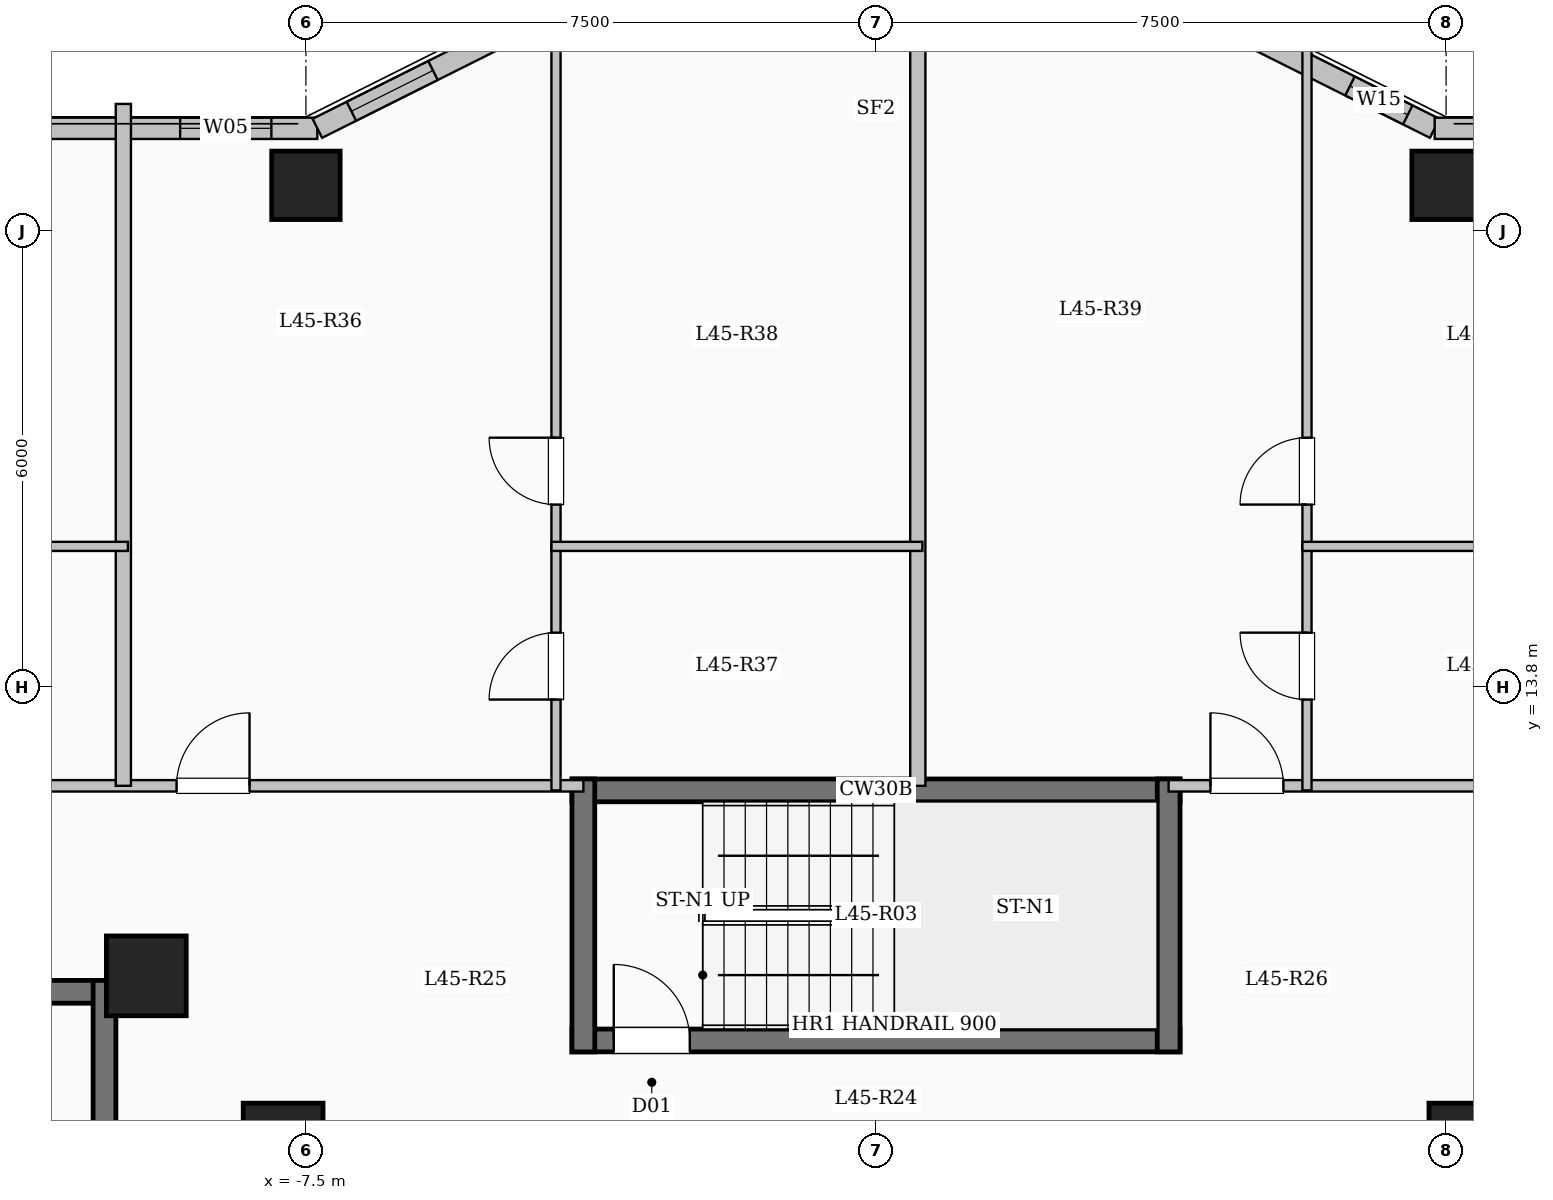
"""IFC4 building model, lengths in metres.
Left out: names, types, materials, properties, quantities, classifications, styles, units other than length and angle.
Written with IfcOpenShell. Run it as: python <this file> out.ifc"""

import sys

from ifc_helpers import new_model, si_unit, direction, frame, frame_2d, origin, origin_2d, place, context, subcontext, project, spatial, rectangle, extrude, element, fill, save


model = new_model("IFC4")
c1 = context("Model", 3, precision=1e-05, world=origin(), true_north=direction((0.0, 1.0)))
c2 = subcontext(c1, "Body", "Model", "MODEL_VIEW")
j1 = project(units=[si_unit("LENGTHUNIT", "METRE"), si_unit("PLANEANGLEUNIT", "RADIAN")], contexts=[c1])
p1 = place(None, origin())
s1 = spatial("IfcSite", under=j1, at=p1, CompositionType="ELEMENT")
p2 = place(p1, origin())
s2 = spatial("IfcBuilding", under=s1, at=p2, CompositionType="ELEMENT")
p3 = place(p2, frame((0.0, 0.0, 166.1)))
s3 = spatial("IfcBuildingStorey", under=s2, at=p3, CompositionType="ELEMENT", Elevation=166.1)
for number, where, z_axis, x_axis in (
    (1, (-7.8, 7.8, 0.0), (0.0, 0.0, 1.0), (1.0, 0.0, 0.0)),
    (2, (7.8, 7.8, 0.0), (0.0, 0.0, 1.0), (1.0, 0.0, 0.0)),
    (3, (-9.6, 10.0, 0.0), (0.0, 0.0, 1.0), (1.0, 0.0, 0.0)),
):
    element("IfcColumn", number, at=place(p3, frame(where, z_axis=z_axis, x_axis=x_axis)), inside=s3, PredefinedType="COLUMN", context=c2, shape_type="SweptSolid", body=[
        extrude(rectangle(XDim=1.05, YDim=1.05, at=origin_2d()), origin(), (0.0, 0.0, 1.0), 3.35),
    ])
for number, where, z_axis, x_axis in (
    (4, (-7.5, 20.4, 0.0), (0.0, 0.0, 1.0), (1.0, 0.0, 0.0)),
    (5, (7.5, 20.4, 0.0), (0.0, 0.0, 1.0), (1.0, 0.0, 0.0)),
):
    element("IfcColumn", number, at=place(p3, frame(where, z_axis=z_axis, x_axis=x_axis)), inside=s3, PredefinedType="COLUMN", context=c2, shape_type="SweptSolid", body=[
        extrude(rectangle(XDim=0.9, YDim=0.9, at=origin_2d()), origin(), (0.0, 0.0, 1.0), 3.35),
    ])
p4 = place(p3, frame((-19.65, 21.15, 0.0), z_axis=(0.0, 0.0, 1.0), x_axis=(1.0, 0.0, 0.0)))
e6 = element("IfcWall", 6, at=p4, inside=s3, PredefinedType="SOLIDWALL", context=c2, shape_type="SweptSolid", body=[
    extrude(rectangle(XDim=12.3, YDim=0.28, at=frame_2d((6.15, 0.0))), origin(), (0.0, 0.0, 1.0), 3.1),
])
p5 = place(p4, frame((1.435, 0.0, 0.9)))
e7 = element("IfcOpeningElement", 7, at=p5, cuts=e6, PredefinedType="OPENING", context=c2, shape_type="SweptSolid", body=[
    extrude(rectangle(XDim=2.2, YDim=1.75, at=frame_2d((1.1, 0.875))), frame((0.0, 0.15, 0.0), z_axis=(0.0, -1.0, 0.0), x_axis=(1.0, 0.0, 0.0)), (0.0, 0.0, 1.0), 0.3),
])
p6 = place(p4, frame((6.555, 0.0, 0.9)))
e8 = element("IfcOpeningElement", 8, at=p6, cuts=e6, PredefinedType="OPENING", context=c2, shape_type="SweptSolid", body=[
    extrude(rectangle(XDim=1.65, YDim=1.6, at=frame_2d((0.825, 0.8))), frame((0.0, 0.15, 0.0), z_axis=(0.0, -1.0, 0.0), x_axis=(1.0, 0.0, 0.0)), (0.0, 0.0, 1.0), 0.3),
])
p7 = place(p4, frame((10.495, 0.0, 0.95)))
e9 = element("IfcOpeningElement", 9, at=p7, cuts=e6, PredefinedType="OPENING", context=c2, shape_type="SweptSolid", body=[
    extrude(rectangle(XDim=1.2, YDim=1.5, at=frame_2d((0.6, 0.75))), frame((0.0, 0.15, 0.0), z_axis=(0.0, -1.0, 0.0), x_axis=(1.0, 0.0, 0.0)), (0.0, 0.0, 1.0), 0.3),
])
p8 = place(p3, frame((-7.35, 21.15, 0.0), z_axis=(0.0, 0.0, 1.0), x_axis=(0.894427191, 0.4472135955, 0.0)))
e10 = element("IfcWall", 10, at=p8, inside=s3, PredefinedType="SOLIDWALL", context=c2, shape_type="SweptSolid", body=[
    extrude(rectangle(XDim=3.354, YDim=0.28, at=frame_2d((1.677, 0.0))), origin(), (0.0, 0.0, 1.0), 3.1),
])
p9 = place(p8, frame((0.501, 0.0, 0.95)))
e11 = element("IfcOpeningElement", 11, at=p9, cuts=e10, PredefinedType="OPENING", context=c2, shape_type="SweptSolid", body=[
    extrude(rectangle(XDim=1.2, YDim=1.5, at=frame_2d((0.6, 0.75))), frame((0.0, 0.15, 0.0), z_axis=(0.0, -1.0, 0.0), x_axis=(1.0, 0.0, 0.0)), (0.0, 0.0, 1.0), 0.3),
])
p10 = place(p3, frame((4.35, 22.65, 0.0), z_axis=(0.0, 0.0, 1.0), x_axis=(0.894427191, -0.4472135955, 0.0)))
e12 = element("IfcWall", 12, at=p10, inside=s3, PredefinedType="SOLIDWALL", context=c2, shape_type="SweptSolid", body=[
    extrude(rectangle(XDim=3.354, YDim=0.28, at=frame_2d((1.677, 0.0))), origin(), (0.0, 0.0, 1.0), 3.1),
])
p11 = place(p10, frame((2.108, 0.0, 0.95)))
e13 = element("IfcOpeningElement", 13, at=p11, cuts=e12, PredefinedType="OPENING", context=c2, shape_type="SweptSolid", body=[
    extrude(rectangle(XDim=0.85, YDim=1.5, at=frame_2d((0.425, 0.75))), frame((0.0, 0.15, 0.0), z_axis=(0.0, -1.0, 0.0), x_axis=(1.0, 0.0, 0.0)), (0.0, 0.0, 1.0), 0.3),
])
p12 = place(p3, frame((7.35, 21.15, 0.0), z_axis=(0.0, 0.0, 1.0), x_axis=(1.0, 0.0, 0.0)))
e14 = element("IfcWall", 14, at=p12, inside=s3, PredefinedType="SOLIDWALL", context=c2, shape_type="SweptSolid", body=[
    extrude(rectangle(XDim=12.3, YDim=0.28, at=frame_2d((6.15, 0.0))), origin(), (0.0, 0.0, 1.0), 3.1),
])
p13 = place(p12, frame((0.731, 0.0, 0.9)))
e15 = element("IfcOpeningElement", 15, at=p13, cuts=e14, PredefinedType="OPENING", context=c2, shape_type="SweptSolid", body=[
    extrude(rectangle(XDim=1.5, YDim=1.65, at=frame_2d((0.75, 0.825))), frame((0.0, 0.15, 0.0), z_axis=(0.0, -1.0, 0.0), x_axis=(1.0, 0.0, 0.0)), (0.0, 0.0, 1.0), 0.3),
])
p14 = place(p12, frame((4.272, 0.0, 0.9)))
e16 = element("IfcOpeningElement", 16, at=p14, cuts=e14, PredefinedType="OPENING", context=c2, shape_type="SweptSolid", body=[
    extrude(rectangle(XDim=2.2, YDim=1.75, at=frame_2d((1.1, 0.875))), frame((0.0, 0.15, 0.0), z_axis=(0.0, -1.0, 0.0), x_axis=(1.0, 0.0, 0.0)), (0.0, 0.0, 1.0), 0.3),
])
p15 = place(p12, frame((9.115, 0.0, 0.9)))
e17 = element("IfcOpeningElement", 17, at=p15, cuts=e14, PredefinedType="OPENING", context=c2, shape_type="SweptSolid", body=[
    extrude(rectangle(XDim=1.65, YDim=1.6, at=frame_2d((0.825, 0.8))), frame((0.0, 0.15, 0.0), z_axis=(0.0, -1.0, 0.0), x_axis=(1.0, 0.0, 0.0)), (0.0, 0.0, 1.0), 0.3),
])
p16 = place(p3, frame((-18.0, 9.79, 0.0), z_axis=(0.0, 0.0, 1.0), x_axis=(1.0, 0.0, 0.0)))
e18 = element("IfcWall", 18, at=p16, inside=s3, PredefinedType="SHEAR", context=c2, shape_type="SweptSolid", body=[
    extrude(rectangle(XDim=8.0, YDim=0.3, at=frame_2d((4.0, 0.0))), origin(), (0.0, 0.0, 1.0), 3.35),
])
p17 = place(p3, frame((-10.15, 6.35, 0.0), z_axis=(0.0, 0.0, 1.0), x_axis=(0.0, 1.0, 0.0)))
e19 = element("IfcWall", 19, at=p17, inside=s3, PredefinedType="SHEAR", context=c2, shape_type="SweptSolid", body=[
    extrude(rectangle(XDim=3.59, YDim=0.3, at=frame_2d((1.795, 0.0))), origin(), (0.0, 0.0, 1.0), 3.35),
])
p18 = place(p3, frame((-4.0, 12.44, 0.0), z_axis=(0.0, 0.0, 1.0), x_axis=(1.0, 0.0, 0.0)))
e20 = element("IfcWall", 20, at=p18, inside=s3, PredefinedType="SHEAR", context=c2, shape_type="SweptSolid", body=[
    extrude(rectangle(XDim=8.0, YDim=0.3, at=frame_2d((4.0, 0.0))), origin(), (0.0, 0.0, 1.0), 3.35),
])
p19 = place(p3, frame((-4.0, 9.15, 0.0), z_axis=(0.0, 0.0, 1.0), x_axis=(1.0, 0.0, 0.0)))
e21 = element("IfcWall", 21, at=p19, inside=s3, PredefinedType="SHEAR", context=c2, shape_type="SweptSolid", body=[
    extrude(rectangle(XDim=8.0, YDim=0.3, at=frame_2d((4.0, 0.0))), origin(), (0.0, 0.0, 1.0), 3.35),
])
p20 = place(p19, frame((0.55, 0.0, 0.0)))
e22 = element("IfcOpeningElement", 22, at=p20, cuts=e21, PredefinedType="OPENING", context=c2, shape_type="SweptSolid", body=[
    extrude(rectangle(XDim=1.0, YDim=2.15, at=frame_2d((0.5, 1.075))), frame((0.0, 0.16, 0.0), z_axis=(0.0, -1.0, 0.0), x_axis=(1.0, 0.0, 0.0)), (0.0, 0.0, 1.0), 0.32),
])
for number, where, z_axis, x_axis in (
    (23, (-3.85, 9.0, 0.0), (0.0, 0.0, 1.0), (0.0, 1.0, 0.0)),
    (24, (3.85, 9.0, 0.0), (0.0, 0.0, 1.0), (0.0, 1.0, 0.0)),
):
    element("IfcWall", number, at=place(p3, frame(where, z_axis=z_axis, x_axis=x_axis)), inside=s3, PredefinedType="SHEAR", context=c2, shape_type="SweptSolid", body=[
        extrude(rectangle(XDim=3.59, YDim=0.3, at=frame_2d((1.795, 0.0))), origin(), (0.0, 0.0, 1.0), 3.35),
    ])
p21 = place(p3, frame((-19.55, 12.5, 0.0), z_axis=(0.0, 0.0, 1.0), x_axis=(1.0, 0.0, 0.0)))
e25 = element("IfcWall", 25, at=p21, inside=s3, PredefinedType="PARTITIONING", context=c2, shape_type="SweptSolid", body=[
    extrude(rectangle(XDim=15.7, YDim=0.15, at=frame_2d((7.85, 0.0))), origin(), (0.0, 0.0, 1.0), 3.1),
])
p22 = place(p21, frame((0.7, 0.0, 0.0)))
e26 = element("IfcOpeningElement", 26, at=p22, cuts=e25, PredefinedType="OPENING", context=c2, shape_type="SweptSolid", body=[
    extrude(rectangle(XDim=0.96, YDim=2.15, at=frame_2d((0.48, 1.075))), frame((0.0, 0.085, 0.0), z_axis=(0.0, -1.0, 0.0), x_axis=(1.0, 0.0, 0.0)), (0.0, 0.0, 1.0), 0.17),
])
p23 = place(p21, frame((10.348, 0.0, 0.0)))
e27 = element("IfcOpeningElement", 27, at=p23, cuts=e25, PredefinedType="OPENING", context=c2, shape_type="SweptSolid", body=[
    extrude(rectangle(XDim=0.96, YDim=2.15, at=frame_2d((0.48, 1.075))), frame((0.0, 0.085, 0.0), z_axis=(0.0, -1.0, 0.0), x_axis=(1.0, 0.0, 0.0)), (0.0, 0.0, 1.0), 0.17),
])
p24 = place(p3, frame((3.85, 12.5, 0.0), z_axis=(0.0, 0.0, 1.0), x_axis=(1.0, 0.0, 0.0)))
e28 = element("IfcWall", 28, at=p24, inside=s3, PredefinedType="PARTITIONING", context=c2, shape_type="SweptSolid", body=[
    extrude(rectangle(XDim=15.7, YDim=0.15, at=frame_2d((7.85, 0.0))), origin(), (0.0, 0.0, 1.0), 3.1),
])
p25 = place(p24, frame((0.55, 0.0, 0.0)))
e29 = element("IfcOpeningElement", 29, at=p25, cuts=e28, PredefinedType="OPENING", context=c2, shape_type="SweptSolid", body=[
    extrude(rectangle(XDim=0.96, YDim=2.15, at=frame_2d((0.48, 1.075))), frame((0.0, 0.085, 0.0), z_axis=(0.0, -1.0, 0.0), x_axis=(1.0, 0.0, 0.0)), (0.0, 0.0, 1.0), 0.17),
])
p26 = place(p24, frame((7.28, 0.0, 0.0)))
e30 = element("IfcOpeningElement", 30, at=p26, cuts=e28, PredefinedType="OPENING", context=c2, shape_type="SweptSolid", body=[
    extrude(rectangle(XDim=0.96, YDim=2.15, at=frame_2d((0.48, 1.075))), frame((0.0, 0.085, 0.0), z_axis=(0.0, -1.0, 0.0), x_axis=(1.0, 0.0, 0.0)), (0.0, 0.0, 1.0), 0.17),
])
p27 = place(p3, frame((0.55, 12.5, 0.0), z_axis=(0.0, 0.0, 1.0), x_axis=(0.0, 1.0, 0.0)))
e31 = element("IfcWall", 31, at=p27, inside=s3, PredefinedType="SOLIDWALL", context=c2, shape_type="SweptSolid", body=[
    extrude(rectangle(XDim=10.18, YDim=0.2, at=frame_2d((5.09, 0.0))), origin(), (0.0, 0.0, 1.0), 3.1),
])
p28 = place(p3, frame((-9.902, 12.5, 0.0), z_axis=(0.0, 0.0, 1.0), x_axis=(0.0, 1.0, 0.0)))
e32 = element("IfcWall", 32, at=p28, inside=s3, PredefinedType="SOLIDWALL", context=c2, shape_type="SweptSolid", body=[
    extrude(rectangle(XDim=8.971, YDim=0.2, at=frame_2d((4.485, 0.0))), origin(), (0.0, 0.0, 1.0), 3.1),
])
p29 = place(p3, frame((-14.722, 15.65, 0.0), z_axis=(0.0, 0.0, 1.0), x_axis=(1.0, 0.0, 0.0)))
e33 = element("IfcWall", 33, at=p29, inside=s3, PredefinedType="PARTITIONING", context=c2, shape_type="SweptSolid", body=[
    extrude(rectangle(XDim=4.88, YDim=0.12, at=frame_2d((2.44, 0.0))), origin(), (0.0, 0.0, 1.0), 2.685),
])
p30 = place(p3, frame((-4.21, 12.44, 0.0), z_axis=(0.0, 0.0, 1.0), x_axis=(0.0, 1.0, 0.0)))
e34 = element("IfcWall", 34, at=p30, inside=s3, PredefinedType="PARTITIONING", context=c2, shape_type="SweptSolid", body=[
    extrude(rectangle(XDim=3.21, YDim=0.12, at=frame_2d((1.605, 0.0))), origin(), (0.0, 0.0, 1.0), 3.1),
])
p31 = place(p30, frame((1.195, 0.0, 0.0)))
e35 = element("IfcOpeningElement", 35, at=p31, cuts=e34, PredefinedType="OPENING", context=c2, shape_type="SweptSolid", body=[
    extrude(rectangle(XDim=0.88, YDim=2.1, at=frame_2d((0.44, 1.05))), frame((0.0, 0.07, 0.0), z_axis=(0.0, -1.0, 0.0), x_axis=(1.0, 0.0, 0.0)), (0.0, 0.0, 1.0), 0.14),
])
p32 = place(p3, frame((-4.21, 15.65, 0.0), z_axis=(0.0, 0.0, 1.0), x_axis=(0.0, 1.0, 0.0)))
e36 = element("IfcWall", 36, at=p32, inside=s3, PredefinedType="PARTITIONING", context=c2, shape_type="SweptSolid", body=[
    extrude(rectangle(XDim=7.03, YDim=0.12, at=frame_2d((3.515, 0.0))), origin(), (0.0, 0.0, 1.0), 3.1),
])
p33 = place(p32, frame((0.55, 0.0, 0.0)))
e37 = element("IfcOpeningElement", 37, at=p33, cuts=e36, PredefinedType="OPENING", context=c2, shape_type="SweptSolid", body=[
    extrude(rectangle(XDim=0.88, YDim=2.1, at=frame_2d((0.44, 1.05))), frame((0.0, 0.07, 0.0), z_axis=(0.0, -1.0, 0.0), x_axis=(1.0, 0.0, 0.0)), (0.0, 0.0, 1.0), 0.14),
])
p34 = place(p3, frame((-4.27, 15.65, 0.0), z_axis=(0.0, 0.0, 1.0), x_axis=(1.0, 0.0, 0.0)))
e38 = element("IfcWall", 38, at=p34, inside=s3, PredefinedType="PARTITIONING", context=c2, shape_type="SweptSolid", body=[
    extrude(rectangle(XDim=4.88, YDim=0.12, at=frame_2d((2.44, 0.0))), origin(), (0.0, 0.0, 1.0), 2.685),
])
p35 = place(p3, frame((5.67, 12.44, 0.0), z_axis=(0.0, 0.0, 1.0), x_axis=(0.0, 1.0, 0.0)))
e39 = element("IfcWall", 39, at=p35, inside=s3, PredefinedType="PARTITIONING", context=c2, shape_type="SweptSolid", body=[
    extrude(rectangle(XDim=3.21, YDim=0.12, at=frame_2d((1.605, 0.0))), origin(), (0.0, 0.0, 1.0), 3.1),
])
p36 = place(p35, frame((1.195, 0.0, 0.0)))
e40 = element("IfcOpeningElement", 40, at=p36, cuts=e39, PredefinedType="OPENING", context=c2, shape_type="SweptSolid", body=[
    extrude(rectangle(XDim=0.88, YDim=2.1, at=frame_2d((0.44, 1.05))), frame((0.0, 0.07, 0.0), z_axis=(0.0, -1.0, 0.0), x_axis=(1.0, 0.0, 0.0)), (0.0, 0.0, 1.0), 0.14),
])
p37 = place(p3, frame((5.67, 15.65, 0.0), z_axis=(0.0, 0.0, 1.0), x_axis=(0.0, 1.0, 0.0)))
e41 = element("IfcWall", 41, at=p37, inside=s3, PredefinedType="PARTITIONING", context=c2, shape_type="SweptSolid", body=[
    extrude(rectangle(XDim=6.865, YDim=0.12, at=frame_2d((3.433, 0.0))), origin(), (0.0, 0.0, 1.0), 3.1),
])
p38 = place(p37, frame((0.55, 0.0, 0.0)))
e42 = element("IfcOpeningElement", 42, at=p38, cuts=e41, PredefinedType="OPENING", context=c2, shape_type="SweptSolid", body=[
    extrude(rectangle(XDim=0.88, YDim=2.1, at=frame_2d((0.44, 1.05))), frame((0.0, 0.07, 0.0), z_axis=(0.0, -1.0, 0.0), x_axis=(1.0, 0.0, 0.0)), (0.0, 0.0, 1.0), 0.14),
])
p39 = place(p3, frame((5.61, 15.65, 0.0), z_axis=(0.0, 0.0, 1.0), x_axis=(1.0, 0.0, 0.0)))
e43 = element("IfcWall", 43, at=p39, inside=s3, PredefinedType="PARTITIONING", context=c2, shape_type="SweptSolid", body=[
    extrude(rectangle(XDim=4.88, YDim=0.12, at=frame_2d((2.44, 0.0))), origin(), (0.0, 0.0, 1.0), 2.685),
])
p40 = place(p7, origin())
e44 = element("IfcWindow", 44, at=p40, inside=s3, PartitioningType="SINGLE_PANEL", PredefinedType="WINDOW", context=c2, shape_type="SweptSolid", body=[
    extrude(rectangle(XDim=1.2, YDim=1.5, at=frame_2d((0.6, 0.75))), frame((0.0, 0.03, 0.0), z_axis=(0.0, -1.0, 0.0), x_axis=(1.0, 0.0, 0.0)), (0.0, 0.0, 1.0), 0.06),
])
fill(e9, e44)
p41 = place(p9, origin())
e45 = element("IfcWindow", 45, at=p41, inside=s3, PartitioningType="SINGLE_PANEL", PredefinedType="WINDOW", context=c2, shape_type="SweptSolid", body=[
    extrude(rectangle(XDim=1.2, YDim=1.5, at=frame_2d((0.6, 0.75))), frame((0.0, 0.03, 0.0), z_axis=(0.0, -1.0, 0.0), x_axis=(1.0, 0.0, 0.0)), (0.0, 0.0, 1.0), 0.06),
])
fill(e11, e45)
p42 = place(p11, origin())
e46 = element("IfcWindow", 46, at=p42, inside=s3, PartitioningType="SINGLE_PANEL", PredefinedType="WINDOW", context=c2, shape_type="SweptSolid", body=[
    extrude(rectangle(XDim=0.85, YDim=1.5, at=frame_2d((0.425, 0.75))), frame((0.0, 0.03, 0.0), z_axis=(0.0, -1.0, 0.0), x_axis=(1.0, 0.0, 0.0)), (0.0, 0.0, 1.0), 0.06),
])
fill(e13, e46)
p43 = place(p20, origin())
e47 = element("IfcDoor", 47, at=p43, inside=s3, OperationType="SINGLE_SWING_LEFT", PredefinedType="DOOR", context=c2, shape_type="SweptSolid", body=[
    extrude(rectangle(XDim=1.0, YDim=2.15, at=frame_2d((0.5, 1.075))), frame((0.0, 0.025, 0.0), z_axis=(0.0, -1.0, 0.0), x_axis=(1.0, 0.0, 0.0)), (0.0, 0.0, 1.0), 0.05),
])
fill(e22, e47)
p44 = place(p23, origin())
e48 = element("IfcDoor", 48, at=p44, inside=s3, OperationType="SINGLE_SWING_RIGHT", PredefinedType="DOOR", context=c2, shape_type="SweptSolid", body=[
    extrude(rectangle(XDim=0.96, YDim=2.15, at=frame_2d((0.48, 1.075))), frame((0.0, 0.025, 0.0), z_axis=(0.0, -1.0, 0.0), x_axis=(1.0, 0.0, 0.0)), (0.0, 0.0, 1.0), 0.05),
])
fill(e27, e48)
p45 = place(p31, origin())
e49 = element("IfcDoor", 49, at=p45, inside=s3, OperationType="SINGLE_SWING_LEFT", PredefinedType="DOOR", context=c2, shape_type="SweptSolid", body=[
    extrude(rectangle(XDim=0.88, YDim=2.1, at=frame_2d((0.44, 1.05))), frame((0.0, 0.025, 0.0), z_axis=(0.0, -1.0, 0.0), x_axis=(1.0, 0.0, 0.0)), (0.0, 0.0, 1.0), 0.05),
])
fill(e35, e49)
p46 = place(p33, origin())
e50 = element("IfcDoor", 50, at=p46, inside=s3, OperationType="SINGLE_SWING_RIGHT", PredefinedType="DOOR", context=c2, shape_type="SweptSolid", body=[
    extrude(rectangle(XDim=0.88, YDim=2.1, at=frame_2d((0.44, 1.05))), frame((0.0, 0.025, 0.0), z_axis=(0.0, -1.0, 0.0), x_axis=(1.0, 0.0, 0.0)), (0.0, 0.0, 1.0), 0.05),
])
fill(e37, e50)
p47 = place(p25, origin())
e51 = element("IfcDoor", 51, at=p47, inside=s3, OperationType="SINGLE_SWING_LEFT", PredefinedType="DOOR", context=c2, shape_type="SweptSolid", body=[
    extrude(rectangle(XDim=0.96, YDim=2.15, at=frame_2d((0.48, 1.075))), frame((0.0, 0.025, 0.0), z_axis=(0.0, -1.0, 0.0), x_axis=(1.0, 0.0, 0.0)), (0.0, 0.0, 1.0), 0.05),
])
fill(e29, e51)
p48 = place(p36, origin())
e52 = element("IfcDoor", 52, at=p48, inside=s3, OperationType="SINGLE_SWING_RIGHT", PredefinedType="DOOR", context=c2, shape_type="SweptSolid", body=[
    extrude(rectangle(XDim=0.88, YDim=2.1, at=frame_2d((0.44, 1.05))), frame((0.0, 0.025, 0.0), z_axis=(0.0, -1.0, 0.0), x_axis=(1.0, 0.0, 0.0)), (0.0, 0.0, 1.0), 0.05),
])
fill(e40, e52)
p49 = place(p38, origin())
e53 = element("IfcDoor", 53, at=p49, inside=s3, OperationType="SINGLE_SWING_LEFT", PredefinedType="DOOR", context=c2, shape_type="SweptSolid", body=[
    extrude(rectangle(XDim=0.88, YDim=2.1, at=frame_2d((0.44, 1.05))), frame((0.0, 0.025, 0.0), z_axis=(0.0, -1.0, 0.0), x_axis=(1.0, 0.0, 0.0)), (0.0, 0.0, 1.0), 0.05),
])
fill(e42, e53)
save(model, sys.argv[1])
